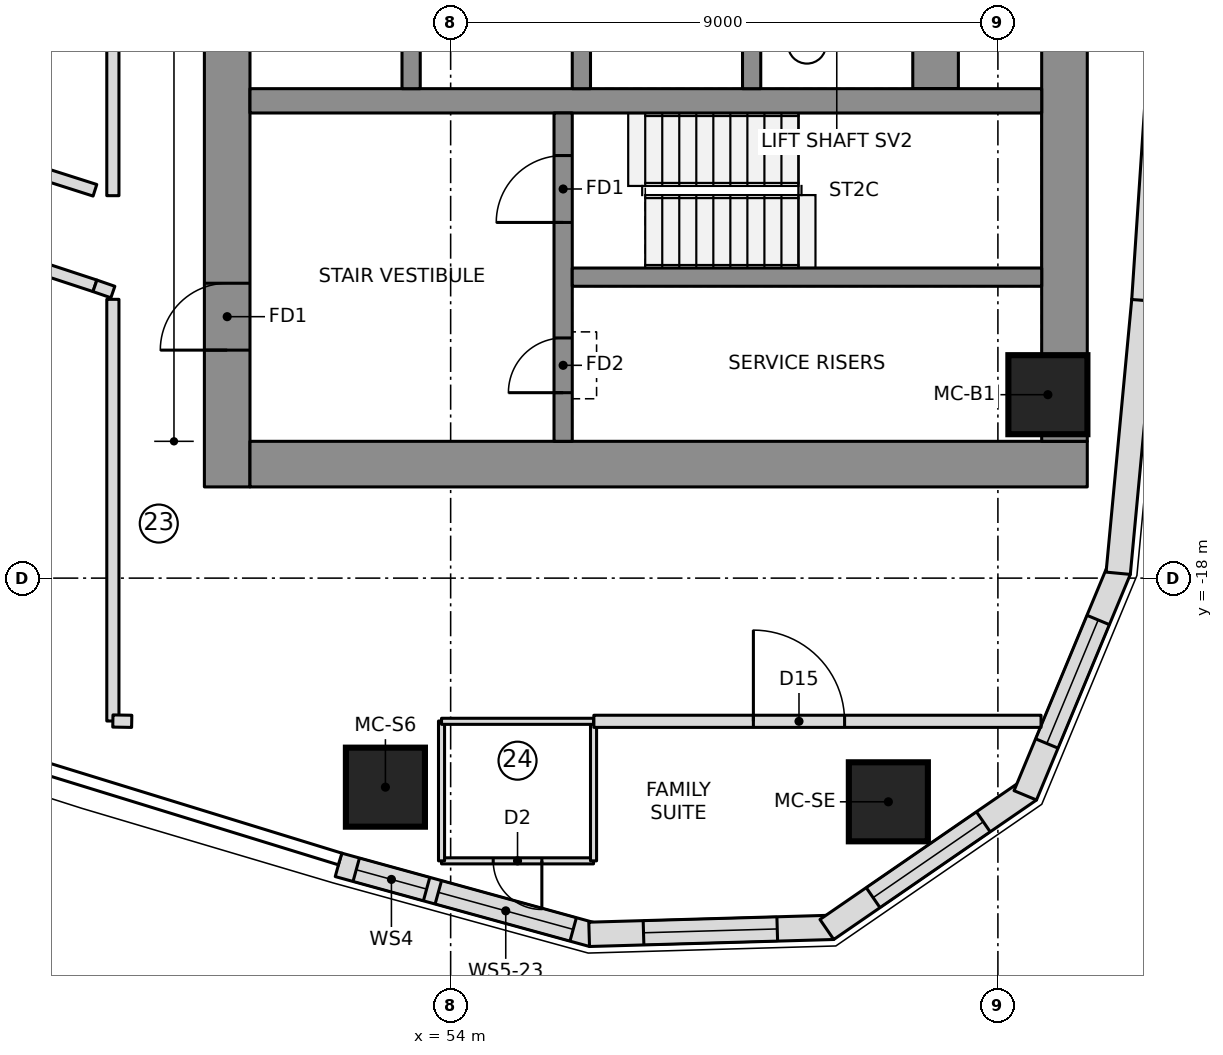
"""IFC4 building model, lengths in metres.
Left out: names, types, materials, properties, quantities, classifications, styles, units other than length and angle.
Written with IfcOpenShell. Run it as: python <this file> out.ifc"""

import sys

from ifc_helpers import new_model, si_unit, direction, frame, frame_2d, origin, origin_2d, place, context, subcontext, project, spatial, polyline, rectangle, outline, extrude, element, fill, save


model = new_model("IFC4")
c1 = context("Model", 3, precision=1e-05, world=origin(), true_north=direction((0.0, 1.0)))
c2 = subcontext(c1, "Body", "Model", "MODEL_VIEW")
j1 = project(units=[si_unit("LENGTHUNIT", "METRE"), si_unit("PLANEANGLEUNIT", "RADIAN")], contexts=[c1])
p1 = place(None, origin())
s1 = spatial("IfcSite", under=j1, at=p1, CompositionType="ELEMENT")
p2 = place(p1, origin())
s2 = spatial("IfcBuilding", under=s1, at=p2, CompositionType="ELEMENT")
p3 = place(p2, frame((0.0, 0.0, 207.45)))
s3 = spatial("IfcBuildingStorey", under=s2, at=p3, CompositionType="ELEMENT", Elevation=207.45)
p4 = place(p3, frame((50.325, -16.5, 0.0), z_axis=(0.0, 0.0, 1.0), x_axis=(0.0, 1.0, 0.0)))
e1 = element("IfcWall", 1, at=p4, inside=s3, PredefinedType="SHEAR", context=c2, shape_type="SweptSolid", body=[
    extrude(rectangle(XDim=9.85, YDim=0.75, at=frame_2d((4.925, 0.0))), origin(), (0.0, 0.0, 1.0), 3.55),
])
p5 = place(p4, frame((2.25, 0.0, 0.0)))
e2 = element("IfcOpeningElement", 2, at=p5, cuts=e1, PredefinedType="OPENING", context=c2, shape_type="SweptSolid", body=[
    extrude(rectangle(XDim=1.1, YDim=2.1, at=frame_2d((0.55, 1.05))), frame((0.0, 0.385, 0.0), z_axis=(0.0, -1.0, 0.0), x_axis=(1.0, 0.0, 0.0)), (0.0, 0.0, 1.0), 0.77),
])
p6 = place(p3, frame((50.7, -16.125, 0.0), z_axis=(0.0, 0.0, 1.0), x_axis=(1.0, 0.0, 0.0)))
e3 = element("IfcWall", 3, at=p6, inside=s3, PredefinedType="SHEAR", context=c2, shape_type="SweptSolid", body=[
    extrude(rectangle(XDim=13.77, YDim=0.75, at=frame_2d((6.885, 0.0))), origin(), (0.0, 0.0, 1.0), 3.55),
])
p7 = place(p3, frame((64.095, -15.75, 0.0), z_axis=(0.0, 0.0, 1.0), x_axis=(0.0, 1.0, 0.0)))
e4 = element("IfcWall", 4, at=p7, inside=s3, PredefinedType="SHEAR", context=c2, shape_type="SweptSolid", body=[
    extrude(rectangle(XDim=7.651, YDim=0.75, at=frame_2d((3.825, 0.0))), origin(), (0.0, 0.0, 1.0), 3.55),
])
p8 = place(p3, frame((61.975, -9.95, 0.0), z_axis=(0.0, 0.0, 1.0), x_axis=(0.0, 1.0, 0.0)))
e5 = element("IfcWall", 5, at=p8, inside=s3, PredefinedType="SHEAR", context=c2, shape_type="SweptSolid", body=[
    extrude(rectangle(XDim=19.9, YDim=0.75, at=frame_2d((9.95, 0.0))), origin(), (0.0, 0.0, 1.0), 3.55),
])
p9 = place(p3, frame((50.7, -10.15, 0.0), z_axis=(0.0, 0.0, 1.0), x_axis=(1.0, 0.0, 0.0)))
e6 = element("IfcWall", 6, at=p9, inside=s3, PredefinedType="SHEAR", context=c2, shape_type="SweptSolid", body=[
    extrude(rectangle(XDim=13.02, YDim=0.4, at=frame_2d((6.51, 0.0))), origin(), (0.0, 0.0, 1.0), 3.55),
])
for number, where, z_axis, x_axis in (
    (7, (53.35, -9.95, 0.0), (0.0, 0.0, 1.0), (0.0, 1.0, 0.0)),
    (8, (56.15, -9.95, 0.0), (0.0, 0.0, 1.0), (0.0, 1.0, 0.0)),
    (9, (58.95, -9.95, 0.0), (0.0, 0.0, 1.0), (0.0, 1.0, 0.0)),
):
    element("IfcWall", number, at=place(p3, frame(where, z_axis=z_axis, x_axis=x_axis)), inside=s3, PredefinedType="SHEAR", context=c2, shape_type="SweptSolid", body=[
        extrude(rectangle(XDim=3.0, YDim=0.3, at=frame_2d((1.5, 0.0))), origin(), (0.0, 0.0, 1.0), 3.55),
    ])
p10 = place(p3, frame((55.85, -15.75, 0.0), z_axis=(0.0, 0.0, 1.0), x_axis=(0.0, 1.0, 0.0)))
e10 = element("IfcWall", 10, at=p10, inside=s3, PredefinedType="SHEAR", context=c2, shape_type="SweptSolid", body=[
    extrude(rectangle(XDim=5.4, YDim=0.3, at=frame_2d((2.7, 0.0))), origin(), (0.0, 0.0, 1.0), 3.55),
])
p11 = place(p10, frame((3.6, 0.0, 0.0)))
e11 = element("IfcOpeningElement", 11, at=p11, cuts=e10, PredefinedType="OPENING", context=c2, shape_type="SweptSolid", body=[
    extrude(rectangle(XDim=1.1, YDim=2.1, at=frame_2d((0.55, 1.05))), frame((0.0, 0.16, 0.0), z_axis=(0.0, -1.0, 0.0), x_axis=(1.0, 0.0, 0.0)), (0.0, 0.0, 1.0), 0.32),
])
p12 = place(p10, frame((0.8, 0.0, 0.0)))
e12 = element("IfcOpeningElement", 12, at=p12, cuts=e10, PredefinedType="OPENING", context=c2, shape_type="SweptSolid", body=[
    extrude(rectangle(XDim=0.9, YDim=2.1, at=frame_2d((0.45, 1.05))), frame((0.0, 0.16, 0.0), z_axis=(0.0, -1.0, 0.0), x_axis=(1.0, 0.0, 0.0)), (0.0, 0.0, 1.0), 0.32),
])
p13 = place(p3, frame((56.0, -13.05, 0.0), z_axis=(0.0, 0.0, 1.0), x_axis=(1.0, 0.0, 0.0)))
e13 = element("IfcWall", 13, at=p13, inside=s3, PredefinedType="SHEAR", context=c2, shape_type="SweptSolid", body=[
    extrude(rectangle(XDim=7.72, YDim=0.3, at=frame_2d((3.86, 0.0))), origin(), (0.0, 0.0, 1.0), 3.55),
])
for number, where, z_axis, x_axis in (
    (14, (52.927, -21.438, 0.0), (0.0, 0.0, 1.0), (1.0, 0.0, 0.0)),
    (15, (61.198, -21.679, 0.0), (0.0, 0.0, 1.0), (1.0, 0.0, 0.0)),
    (16, (63.822, -14.983, 0.0), (0.0, 0.0, 1.0), (1.0, 0.0, 0.0)),
):
    element("IfcColumn", number, at=place(p3, frame(where, z_axis=z_axis, x_axis=x_axis)), inside=s3, PredefinedType="COLUMN", context=c2, shape_type="SweptSolid", body=[
        extrude(rectangle(XDim=1.3, YDim=1.3, at=origin_2d()), origin(), (0.0, 0.0, 1.0), 3.55),
    ])
p14 = place(p3, frame((52.155, -22.716, 0.0), z_axis=(0.0, 0.0, 1.0), x_axis=(0.964205755089, -0.265155165617, 0.0)))
e17 = element("IfcWall", 17, at=p14, inside=s3, PredefinedType="NOTDEFINED", context=c2, shape_type="SweptSolid", body=[
    extrude(outline(polyline([(0.0, -0.2), (4.337, -0.2), (4.277, 0.2), (0.0, 0.2), (0.0, -0.2)])), origin(), (0.0, 0.0, 1.0), 3.25),
])
p15 = place(p14, frame((0.303, 0.0, 0.9)))
e18 = element("IfcOpeningElement", 18, at=p15, cuts=e17, PredefinedType="OPENING", context=c2, shape_type="SweptSolid", body=[
    extrude(rectangle(XDim=1.2, YDim=1.8, at=frame_2d((0.6, 0.9))), frame((0.0, 0.21, 0.0), z_axis=(0.0, -1.0, 0.0), x_axis=(1.0, 0.0, 0.0)), (0.0, 0.0, 1.0), 0.42),
])
p16 = place(p14, frame((1.704, 0.0, 0.9)))
e19 = element("IfcOpeningElement", 19, at=p16, cuts=e17, PredefinedType="OPENING", context=c2, shape_type="SweptSolid", body=[
    extrude(rectangle(XDim=2.3, YDim=1.8, at=frame_2d((1.15, 0.9))), frame((0.0, 0.21, 0.0), z_axis=(0.0, -1.0, 0.0), x_axis=(1.0, 0.0, 0.0)), (0.0, 0.0, 1.0), 0.42),
])
p17 = place(p3, frame((56.308, -23.858, 0.0), z_axis=(0.0, 0.0, 1.0), x_axis=(0.999587920197, 0.028705222472, 0.0)))
e20 = element("IfcWall", 20, at=p17, inside=s3, PredefinedType="NOTDEFINED", context=c2, shape_type="SweptSolid", body=[
    extrude(outline(polyline([(-0.03, -0.2), (3.989, -0.2), (3.87, 0.2), (0.03, 0.2), (-0.03, -0.2)])), origin(), (0.0, 0.0, 1.0), 3.25),
])
p18 = place(p17, frame((0.865, 0.0, 0.6)))
e21 = element("IfcOpeningElement", 21, at=p18, cuts=e20, PredefinedType="OPENING", context=c2, shape_type="SweptSolid", body=[
    extrude(outline(polyline([(0.0, 1.35), (0.084, 1.771), (0.322, 2.128), (0.679, 2.366), (1.1, 2.45), (1.521, 2.366), (1.878, 2.128), (2.116, 1.771), (2.2, 1.35), (2.2, 1.1), (2.116, 0.679), (1.878, 0.322), (1.521, 0.084), (1.1, 0.0), (0.679, 0.084), (0.322, 0.322), (0.084, 0.679), (0.0, 1.1), (0.0, 1.35)])), frame((0.0, 0.21, 0.0), z_axis=(0.0, -1.0, 0.0), x_axis=(1.0, 0.0, 0.0)), (0.0, 0.0, 1.0), 0.42),
])
p19 = place(p3, frame((60.236, -23.745, 0.0), z_axis=(0.0, 0.0, 1.0), x_axis=(0.823806162588, 0.566871596115, 0.0)))
e22 = element("IfcWall", 22, at=p19, inside=s3, PredefinedType="NOTDEFINED", context=c2, shape_type="SweptSolid", body=[
    extrude(outline(polyline([(-0.059, -0.2), (3.988, -0.2), (3.87, 0.2), (0.059, 0.2), (-0.059, -0.2)])), origin(), (0.0, 0.0, 1.0), 3.25),
])
p20 = place(p19, frame((0.865, 0.0, 0.6)))
e23 = element("IfcOpeningElement", 23, at=p20, cuts=e22, PredefinedType="OPENING", context=c2, shape_type="SweptSolid", body=[
    extrude(outline(polyline([(0.0, 1.35), (0.084, 1.771), (0.322, 2.128), (0.679, 2.366), (1.1, 2.45), (1.521, 2.366), (1.878, 2.128), (2.116, 1.771), (2.2, 1.35), (2.2, 1.1), (2.116, 0.679), (1.878, 0.322), (1.521, 0.084), (1.1, 0.0), (0.679, 0.084), (0.322, 0.322), (0.084, 0.679), (0.0, 1.1), (0.0, 1.35)])), frame((0.0, 0.21, 0.0), z_axis=(0.0, -1.0, 0.0), x_axis=(1.0, 0.0, 0.0)), (0.0, 0.0, 1.0), 0.42),
])
p21 = place(p3, frame((63.472, -21.518, 0.0), z_axis=(0.0, 0.0, 1.0), x_axis=(0.383997619794, 0.923334082547, 0.0)))
e24 = element("IfcWall", 24, at=p21, inside=s3, PredefinedType="NOTDEFINED", context=c2, shape_type="SweptSolid", body=[
    extrude(outline(polyline([(-0.059, -0.2), (3.959, -0.2), (3.899, 0.2), (0.059, 0.2), (-0.059, -0.2)])), origin(), (0.0, 0.0, 1.0), 3.25),
])
p22 = place(p21, frame((0.865, 0.0, 0.6)))
e25 = element("IfcOpeningElement", 25, at=p22, cuts=e24, PredefinedType="OPENING", context=c2, shape_type="SweptSolid", body=[
    extrude(outline(polyline([(0.0, 1.35), (0.084, 1.771), (0.322, 2.128), (0.679, 2.366), (1.1, 2.45), (1.521, 2.366), (1.878, 2.128), (2.116, 1.771), (2.2, 1.35), (2.2, 1.1), (2.116, 0.679), (1.878, 0.322), (1.521, 0.084), (1.1, 0.0), (0.679, 0.084), (0.322, 0.322), (0.084, 0.679), (0.0, 1.1), (0.0, 1.35)])), frame((0.0, 0.21, 0.0), z_axis=(0.0, -1.0, 0.0), x_axis=(1.0, 0.0, 0.0)), (0.0, 0.0, 1.0), 0.42),
])
p23 = place(p3, frame((64.981, -17.89, 0.0), z_axis=(0.0, 0.0, 1.0), x_axis=(0.093605694738, 0.995609348044, 0.0)))
e26 = element("IfcWall", 26, at=p23, inside=s3, PredefinedType="NOTDEFINED", context=c2, shape_type="SweptSolid", body=[
    extrude(outline(polyline([(-0.03, -0.2), (4.484, -0.2), (4.478, 0.2), (0.03, 0.2), (-0.03, -0.2)])), origin(), (0.0, 0.0, 1.0), 3.25),
])
p24 = place(p3, frame((65.401, -13.429, 0.0), z_axis=(0.0, 0.0, 1.0), x_axis=(0.066905935948, 0.997759287471, 0.0)))
e27 = element("IfcWall", 27, at=p24, inside=s3, PredefinedType="NOTDEFINED", context=c2, shape_type="SweptSolid", body=[
    extrude(outline(polyline([(-0.003, -0.2), (4.484, -0.2), (4.478, 0.2), (0.003, 0.2), (-0.003, -0.2)])), origin(), (0.0, 0.0, 1.0), 3.25),
])
p25 = place(p3, frame((56.35, -22.65, 0.0), z_axis=(0.0, 0.0, 1.0), x_axis=(-1.0, 0.0, 0.0)))
e28 = element("IfcWall", 28, at=p25, inside=s3, PredefinedType="PARTITIONING", context=c2, shape_type="SweptSolid", body=[
    extrude(rectangle(XDim=2.5, YDim=0.1, at=frame_2d((1.25, 0.0))), origin(), (0.0, 0.0, 1.0), 3.15),
])
p26 = place(p25, frame((0.85, 0.0, 0.0)))
e29 = element("IfcOpeningElement", 29, at=p26, cuts=e28, PredefinedType="OPENING", context=c2, shape_type="SweptSolid", body=[
    extrude(rectangle(XDim=0.8, YDim=2.1, at=frame_2d((0.4, 1.05))), frame((0.0, 0.06, 0.0), z_axis=(0.0, -1.0, 0.0), x_axis=(1.0, 0.0, 0.0)), (0.0, 0.0, 1.0), 0.12),
])
for number, where, z_axis, x_axis in (
    (30, (53.85, -22.65, 0.0), (0.0, 0.0, 1.0), (0.0, 1.0, 0.0)),
    (31, (56.35, -20.35, 0.0), (0.0, 0.0, 1.0), (0.0, -1.0, 0.0)),
):
    element("IfcWall", number, at=place(p3, frame(where, z_axis=z_axis, x_axis=x_axis)), inside=s3, PredefinedType="PARTITIONING", context=c2, shape_type="SweptSolid", body=[
        extrude(rectangle(XDim=2.3, YDim=0.1, at=frame_2d((1.15, 0.0))), origin(), (0.0, 0.0, 1.0), 3.15),
    ])
p27 = place(p3, frame((56.355, -20.355, 0.0), z_axis=(0.0, 0.0, 1.0), x_axis=(1.0, 0.0, 0.0)))
e32 = element("IfcWall", 32, at=p27, inside=s3, PredefinedType="PARTITIONING", context=c2, shape_type="SweptSolid", body=[
    extrude(rectangle(XDim=7.354, YDim=0.2, at=frame_2d((3.677, 0.0))), origin(), (0.0, 0.0, 1.0), 3.15),
])
p28 = place(p27, frame((2.624, 0.0, 0.0)))
e33 = element("IfcOpeningElement", 33, at=p28, cuts=e32, PredefinedType="OPENING", context=c2, shape_type="SweptSolid", body=[
    extrude(rectangle(XDim=1.5, YDim=2.1, at=frame_2d((0.75, 1.05))), frame((0.0, 0.11, 0.0), z_axis=(0.0, -1.0, 0.0), x_axis=(1.0, 0.0, 0.0)), (0.0, 0.0, 1.0), 0.22),
])
p29 = place(p3, frame((53.85, -20.355, 0.0), z_axis=(0.0, 0.0, 1.0), x_axis=(1.0, 0.0, 0.0)))
e34 = element("IfcWall", 34, at=p29, inside=s3, PredefinedType="PARTITIONING", context=c2, shape_type="SweptSolid", body=[
    extrude(rectangle(XDim=2.5, YDim=0.1, at=frame_2d((1.25, 0.0))), origin(), (0.0, 0.0, 1.0), 3.15),
])
p30 = place(p3, frame((43.026, -11.507, 0.0), z_axis=(0.0, 0.0, 1.0), x_axis=(0.949951949432, -0.312396052744, 0.0)))
e35 = element("IfcWall", 35, at=p30, inside=s3, PredefinedType="PARTITIONING", context=c2, shape_type="SweptSolid", body=[
    extrude(rectangle(XDim=5.394, YDim=0.2, at=frame_2d((2.697, 0.0))), origin(), (0.0, 0.0, 1.0), 3.15),
])
p31 = place(p30, frame((3.05, 0.0, 0.0)))
e36 = element("IfcOpeningElement", 36, at=p31, cuts=e35, PredefinedType="OPENING", context=c2, shape_type="SweptSolid", body=[
    extrude(rectangle(XDim=1.0, YDim=2.1, at=frame_2d((0.5, 1.05))), frame((0.0, 0.11, 0.0), z_axis=(0.0, -1.0, 0.0), x_axis=(1.0, 0.0, 0.0)), (0.0, 0.0, 1.0), 0.22),
])
p32 = place(p3, frame((48.15, -11.621, 0.0), z_axis=(0.0, 0.0, 1.0), x_axis=(-0.952761948983, 0.303718074157, 0.0)))
e37 = element("IfcWall", 37, at=p32, inside=s3, PredefinedType="PARTITIONING", context=c2, shape_type="SweptSolid", body=[
    extrude(rectangle(XDim=1.332, YDim=0.2, at=frame_2d((0.666, 0.0))), origin(), (0.0, 0.0, 1.0), 3.15),
])
p33 = place(p3, frame((48.445, 11.71, 0.0), z_axis=(0.0, 0.0, 1.0), x_axis=(0.0, -1.0, 0.0)))
e38 = element("IfcWall", 38, at=p33, inside=s3, PredefinedType="PARTITIONING", context=c2, shape_type="SweptSolid", body=[
    extrude(rectangle(XDim=23.42, YDim=0.2, at=frame_2d((11.71, 0.0))), origin(), (0.0, 0.0, 1.0), 3.15),
])
p34 = place(p3, frame((48.15, -13.192, 0.0), z_axis=(0.0, 0.0, 1.0), x_axis=(0.944623214561, -0.328156947987, 0.0)))
e39 = element("IfcWall", 39, at=p34, inside=s3, PredefinedType="PARTITIONING", context=c2, shape_type="SweptSolid", body=[
    extrude(rectangle(XDim=0.312, YDim=0.2, at=frame_2d((0.156, 0.0))), origin(), (0.0, 0.0, 1.0), 3.15),
])
p35 = place(p3, frame((48.445, -13.415, 0.0), z_axis=(0.0, 0.0, 1.0), x_axis=(0.0, -1.0, 0.0)))
e40 = element("IfcWall", 40, at=p35, inside=s3, PredefinedType="PARTITIONING", context=c2, shape_type="SweptSolid", body=[
    extrude(rectangle(XDim=6.935, YDim=0.2, at=frame_2d((3.468, 0.0))), origin(), (0.0, 0.0, 1.0), 3.15),
])
p36 = place(p3, frame((48.445, -20.35, 0.0), z_axis=(0.0, 0.0, 1.0), x_axis=(0.999849757003, -0.017333880736, 0.0)))
e41 = element("IfcWall", 41, at=p36, inside=s3, PredefinedType="PARTITIONING", context=c2, shape_type="SweptSolid", body=[
    extrude(rectangle(XDim=0.31, YDim=0.2, at=frame_2d((0.155, 0.0))), origin(), (0.0, 0.0, 1.0), 3.15),
])
p37 = place(p15, origin())
e42 = element("IfcWindow", 42, at=p37, inside=s3, PartitioningType="SINGLE_PANEL", PredefinedType="WINDOW", context=c2, shape_type="SweptSolid", body=[
    extrude(rectangle(XDim=1.2, YDim=1.8, at=frame_2d((0.6, 0.9))), frame((0.0, 0.17, 0.0), z_axis=(0.0, -1.0, 0.0), x_axis=(1.0, 0.0, 0.0)), (0.0, 0.0, 1.0), 0.06),
])
fill(e18, e42)
p38 = place(p16, origin())
e43 = element("IfcWindow", 43, at=p38, inside=s3, PartitioningType="SINGLE_PANEL", PredefinedType="WINDOW", context=c2, shape_type="SweptSolid", body=[
    extrude(rectangle(XDim=2.3, YDim=1.8, at=frame_2d((1.15, 0.9))), frame((0.0, 0.17, 0.0), z_axis=(0.0, -1.0, 0.0), x_axis=(1.0, 0.0, 0.0)), (0.0, 0.0, 1.0), 0.06),
])
fill(e19, e43)
p39 = place(p18, origin())
e44 = element("IfcWindow", 44, at=p39, inside=s3, PartitioningType="SINGLE_PANEL", PredefinedType="WINDOW", context=c2, shape_type="SweptSolid", body=[
    extrude(outline(polyline([(0.0, 1.35), (0.084, 1.771), (0.322, 2.128), (0.679, 2.366), (1.1, 2.45), (1.521, 2.366), (1.878, 2.128), (2.116, 1.771), (2.2, 1.35), (2.2, 1.1), (2.116, 0.679), (1.878, 0.322), (1.521, 0.084), (1.1, 0.0), (0.679, 0.084), (0.322, 0.322), (0.084, 0.679), (0.0, 1.1), (0.0, 1.35)])), frame((0.0, 0.17, 0.0), z_axis=(0.0, -1.0, 0.0), x_axis=(1.0, 0.0, 0.0)), (0.0, 0.0, 1.0), 0.06),
])
fill(e21, e44)
p40 = place(p20, origin())
e45 = element("IfcWindow", 45, at=p40, inside=s3, PartitioningType="SINGLE_PANEL", PredefinedType="WINDOW", context=c2, shape_type="SweptSolid", body=[
    extrude(outline(polyline([(0.0, 1.35), (0.084, 1.771), (0.322, 2.128), (0.679, 2.366), (1.1, 2.45), (1.521, 2.366), (1.878, 2.128), (2.116, 1.771), (2.2, 1.35), (2.2, 1.1), (2.116, 0.679), (1.878, 0.322), (1.521, 0.084), (1.1, 0.0), (0.679, 0.084), (0.322, 0.322), (0.084, 0.679), (0.0, 1.1), (0.0, 1.35)])), frame((0.0, 0.17, 0.0), z_axis=(0.0, -1.0, 0.0), x_axis=(1.0, 0.0, 0.0)), (0.0, 0.0, 1.0), 0.06),
])
fill(e23, e45)
p41 = place(p22, origin())
e46 = element("IfcWindow", 46, at=p41, inside=s3, PartitioningType="SINGLE_PANEL", PredefinedType="WINDOW", context=c2, shape_type="SweptSolid", body=[
    extrude(outline(polyline([(0.0, 1.35), (0.084, 1.771), (0.322, 2.128), (0.679, 2.366), (1.1, 2.45), (1.521, 2.366), (1.878, 2.128), (2.116, 1.771), (2.2, 1.35), (2.2, 1.1), (2.116, 0.679), (1.878, 0.322), (1.521, 0.084), (1.1, 0.0), (0.679, 0.084), (0.322, 0.322), (0.084, 0.679), (0.0, 1.1), (0.0, 1.35)])), frame((0.0, 0.17, 0.0), z_axis=(0.0, -1.0, 0.0), x_axis=(1.0, 0.0, 0.0)), (0.0, 0.0, 1.0), 0.06),
])
fill(e25, e46)
p42 = place(p26, origin())
e47 = element("IfcDoor", 47, at=p42, inside=s3, OperationType="SINGLE_SWING_LEFT", PredefinedType="DOOR", context=c2, shape_type="SweptSolid", body=[
    extrude(rectangle(XDim=0.8, YDim=2.1, at=frame_2d((0.4, 1.05))), frame((0.0, 0.025, 0.0), z_axis=(0.0, -1.0, 0.0), x_axis=(1.0, 0.0, 0.0)), (0.0, 0.0, 1.0), 0.05),
])
fill(e29, e47)
p43 = place(p28, origin())
e48 = element("IfcDoor", 48, at=p43, inside=s3, OperationType="DOUBLE_DOOR_SINGLE_SWING", PredefinedType="DOOR", context=c2, shape_type="SweptSolid", body=[
    extrude(rectangle(XDim=1.5, YDim=2.1, at=frame_2d((0.75, 1.05))), frame((0.0, 0.025, 0.0), z_axis=(0.0, -1.0, 0.0), x_axis=(1.0, 0.0, 0.0)), (0.0, 0.0, 1.0), 0.05),
])
fill(e33, e48)
p44 = place(p11, origin())
e49 = element("IfcDoor", 49, at=p44, inside=s3, OperationType="SINGLE_SWING_RIGHT", PredefinedType="DOOR", context=c2, shape_type="SweptSolid", body=[
    extrude(rectangle(XDim=1.1, YDim=2.1, at=frame_2d((0.55, 1.05))), frame((0.0, 0.025, 0.0), z_axis=(0.0, -1.0, 0.0), x_axis=(1.0, 0.0, 0.0)), (0.0, 0.0, 1.0), 0.05),
])
fill(e11, e49)
p45 = place(p5, origin())
e50 = element("IfcDoor", 50, at=p45, inside=s3, OperationType="SINGLE_SWING_RIGHT", PredefinedType="DOOR", context=c2, shape_type="SweptSolid", body=[
    extrude(rectangle(XDim=1.1, YDim=2.1, at=frame_2d((0.55, 1.05))), frame((0.0, 0.025, 0.0), z_axis=(0.0, -1.0, 0.0), x_axis=(1.0, 0.0, 0.0)), (0.0, 0.0, 1.0), 0.05),
])
fill(e2, e50)
p46 = place(p12, origin())
e51 = element("IfcDoor", 51, at=p46, inside=s3, OperationType="SINGLE_SWING_LEFT", PredefinedType="DOOR", context=c2, shape_type="SweptSolid", body=[
    extrude(rectangle(XDim=0.9, YDim=2.1, at=frame_2d((0.45, 1.05))), frame((0.0, 0.025, 0.0), z_axis=(0.0, -1.0, 0.0), x_axis=(1.0, 0.0, 0.0)), (0.0, 0.0, 1.0), 0.05),
])
fill(e12, e51)
save(model, sys.argv[1])
